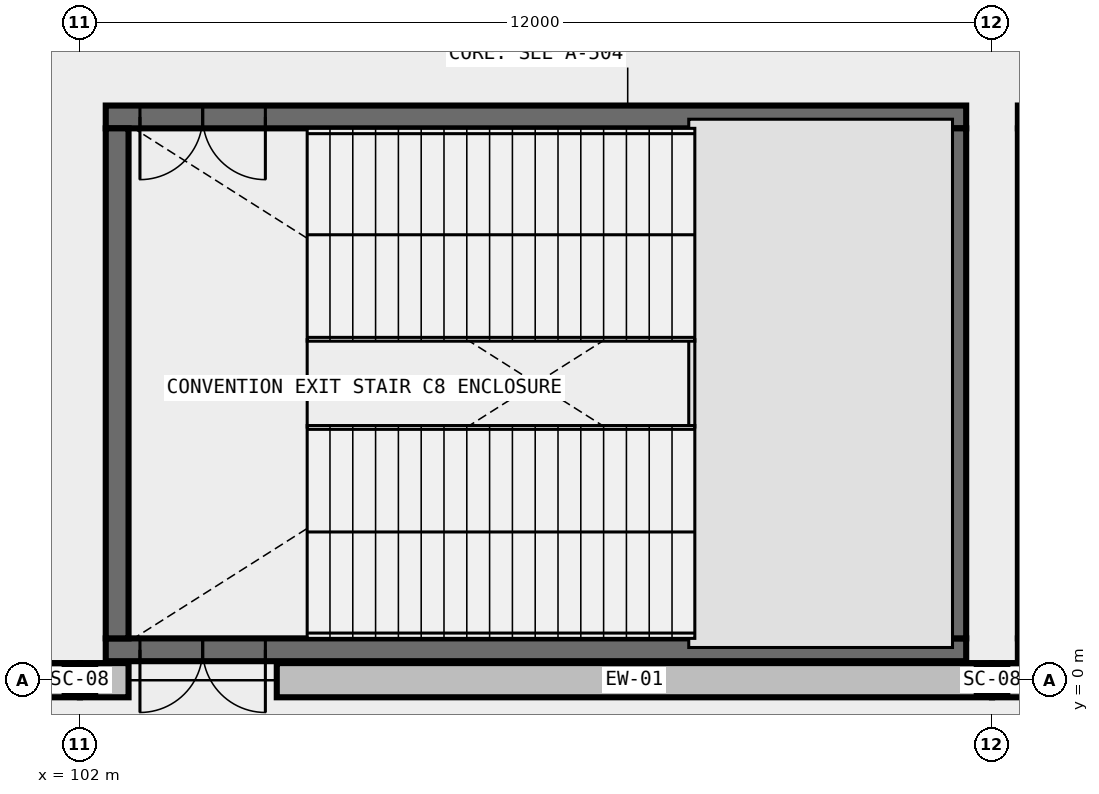
"""IFC4 building model, lengths in metres.
Left out: names, types, materials, properties, quantities, classifications, styles, units other than length and angle.
Written with IfcOpenShell. Run it as: python <this file> out.ifc"""

import sys

from ifc_helpers import new_model, si_unit, direction, frame, frame_2d, origin, origin_2d, place, context, subcontext, project, spatial, rectangle, i_section, extrude, element, fill, save


model = new_model("IFC4")
c1 = context("Model", 3, precision=1e-05, world=origin(), true_north=direction((0.0, 1.0)))
c2 = subcontext(c1, "Body", "Model", "MODEL_VIEW")
j1 = project(units=[si_unit("LENGTHUNIT", "METRE"), si_unit("PLANEANGLEUNIT", "RADIAN")], contexts=[c1])
p1 = place(None, origin())
s1 = spatial("IfcSite", under=j1, at=p1, CompositionType="ELEMENT")
p2 = place(p1, origin())
s2 = spatial("IfcBuilding", under=s1, at=p2, CompositionType="ELEMENT")
p3 = place(p2, origin())
s3 = spatial("IfcBuildingStorey", under=s2, at=p3, CompositionType="ELEMENT", Elevation=0.0)
for number, where, z_axis, x_axis in (
    (1, (102.0, 0.0, 0.0), (0.0, 0.0, 1.0), (1.0, 0.0, 0.0)),
    (2, (114.0, 0.0, 0.0), (0.0, 0.0, 1.0), (1.0, 0.0, 0.0)),
):
    element("IfcColumn", number, at=place(p3, frame(where, z_axis=z_axis, x_axis=x_axis)), inside=s3, PredefinedType="COLUMN", context=c2, shape_type="SweptSolid", body=[
        extrude(i_section(OverallWidth=0.401, OverallDepth=0.399, WebThickness=0.025, FlangeThickness=0.04, FilletRadius=0.031, at=origin_2d()), origin(), (0.0, 0.0, 1.0), 6.0),
    ])
p4 = place(p3, frame((113.66, 0.4, 0.0), z_axis=(0.0, 0.0, 1.0), x_axis=(-1.0, 0.0, 0.0)))
e3 = element("IfcWall", 3, at=p4, inside=s3, PredefinedType="SHEAR", context=c2, shape_type="SweptSolid", body=[
    extrude(rectangle(XDim=11.32, YDim=0.3, at=frame_2d((5.66, 0.0))), origin(), (0.0, 0.0, 1.0), 6.0),
])
p5 = place(p4, frame((9.22, 0.0, 0.0)))
e4 = element("IfcOpeningElement", 4, at=p5, cuts=e3, PredefinedType="OPENING", context=c2, shape_type="SweptSolid", body=[
    extrude(rectangle(XDim=1.65, YDim=2.25, at=frame_2d((0.825, 1.125))), frame((0.0, 0.165, 0.0), z_axis=(0.0, -1.0, 0.0), x_axis=(1.0, 0.0, 0.0)), (0.0, 0.0, 1.0), 0.33),
])
p6 = place(p3, frame((113.66, 7.41, 0.0), z_axis=(0.0, 0.0, 1.0), x_axis=(-1.0, 0.0, 0.0)))
e5 = element("IfcWall", 5, at=p6, inside=s3, PredefinedType="SHEAR", context=c2, shape_type="SweptSolid", body=[
    extrude(rectangle(XDim=11.32, YDim=0.3, at=frame_2d((5.66, 0.0))), origin(), (0.0, 0.0, 1.0), 6.0),
])
p7 = place(p6, frame((9.22, 0.0, 0.0)))
e6 = element("IfcOpeningElement", 6, at=p7, cuts=e5, PredefinedType="OPENING", context=c2, shape_type="SweptSolid", body=[
    extrude(rectangle(XDim=1.65, YDim=2.25, at=frame_2d((0.825, 1.125))), frame((0.0, 0.165, 0.0), z_axis=(0.0, -1.0, 0.0), x_axis=(1.0, 0.0, 0.0)), (0.0, 0.0, 1.0), 0.33),
])
for number, where, z_axis, x_axis in (
    (7, (102.49, 7.26, 0.0), (0.0, 0.0, 1.0), (0.0, -1.0, 0.0)),
    (8, (113.51, 0.55, 0.0), (0.0, 0.0, 1.0), (0.0, 1.0, 0.0)),
):
    element("IfcWall", number, at=place(p3, frame(where, z_axis=z_axis, x_axis=x_axis)), inside=s3, PredefinedType="SHEAR", context=c2, shape_type="SweptSolid", body=[
        extrude(rectangle(XDim=6.71, YDim=0.3, at=frame_2d((3.355, 0.0))), origin(), (0.0, 0.0, 1.0), 6.0),
    ])
p8 = place(p3, frame((125.66, 0.4, 0.0), z_axis=(0.0, 0.0, 1.0), x_axis=(-1.0, 0.0, 0.0)))
e9 = element("IfcWall", 9, at=p8, inside=s3, PredefinedType="SHEAR", context=c2, shape_type="SweptSolid", body=[
    extrude(rectangle(XDim=11.32, YDim=0.3, at=frame_2d((5.66, 0.0))), origin(), (0.0, 0.0, 1.0), 6.0),
])
p9 = place(p8, frame((9.22, 0.0, 0.0)))
e10 = element("IfcOpeningElement", 10, at=p9, cuts=e9, PredefinedType="OPENING", context=c2, shape_type="SweptSolid", body=[
    extrude(rectangle(XDim=1.65, YDim=2.25, at=frame_2d((0.825, 1.125))), frame((0.0, 0.165, 0.0), z_axis=(0.0, -1.0, 0.0), x_axis=(1.0, 0.0, 0.0)), (0.0, 0.0, 1.0), 0.33),
])
p10 = place(p3, frame((125.66, 7.41, 0.0), z_axis=(0.0, 0.0, 1.0), x_axis=(-1.0, 0.0, 0.0)))
e11 = element("IfcWall", 11, at=p10, inside=s3, PredefinedType="SHEAR", context=c2, shape_type="SweptSolid", body=[
    extrude(rectangle(XDim=11.32, YDim=0.3, at=frame_2d((5.66, 0.0))), origin(), (0.0, 0.0, 1.0), 6.0),
])
p11 = place(p10, frame((9.22, 0.0, 0.0)))
e12 = element("IfcOpeningElement", 12, at=p11, cuts=e11, PredefinedType="OPENING", context=c2, shape_type="SweptSolid", body=[
    extrude(rectangle(XDim=1.65, YDim=2.25, at=frame_2d((0.825, 1.125))), frame((0.0, 0.165, 0.0), z_axis=(0.0, -1.0, 0.0), x_axis=(1.0, 0.0, 0.0)), (0.0, 0.0, 1.0), 0.33),
])
p12 = place(p3, frame((114.49, 7.26, 0.0), z_axis=(0.0, 0.0, 1.0), x_axis=(0.0, -1.0, 0.0)))
e13 = element("IfcWall", 13, at=p12, inside=s3, PredefinedType="SHEAR", context=c2, shape_type="SweptSolid", body=[
    extrude(rectangle(XDim=6.71, YDim=0.3, at=frame_2d((3.355, 0.0))), origin(), (0.0, 0.0, 1.0), 6.0),
])
p13 = place(p3, frame((96.0, 0.0, 0.0), z_axis=(0.0, 0.0, 1.0), x_axis=(1.0, 0.0, 0.0)))
e14 = element("IfcWall", 14, at=p13, inside=s3, PredefinedType="STANDARD", context=c2, shape_type="SweptSolid", body=[
    extrude(rectangle(XDim=6.0, YDim=0.45, at=frame_2d((3.0, 0.0))), origin(), (0.0, 0.0, 1.0), 4.676),
])
p14 = place(p3, frame((102.0, 0.0, 0.0), z_axis=(0.0, 0.0, 1.0), x_axis=(1.0, 0.0, 0.0)))
e15 = element("IfcWall", 15, at=p14, inside=s3, PredefinedType="STANDARD", context=c2, shape_type="SweptSolid", body=[
    extrude(rectangle(XDim=0.64, YDim=0.45, at=frame_2d((0.32, 0.0))), origin(), (0.0, 0.0, 1.0), 4.676),
])
p15 = place(p3, frame((104.59, 0.0, 0.0), z_axis=(0.0, 0.0, 1.0), x_axis=(1.0, 0.0, 0.0)))
e16 = element("IfcWall", 16, at=p15, inside=s3, PredefinedType="STANDARD", context=c2, shape_type="SweptSolid", body=[
    extrude(rectangle(XDim=9.41, YDim=0.45, at=frame_2d((4.705, 0.0))), origin(), (0.0, 0.0, 1.0), 4.676),
])
p16 = place(p3, frame((114.0, 0.0, 0.0), z_axis=(0.0, 0.0, 1.0), x_axis=(1.0, 0.0, 0.0)))
e17 = element("IfcWall", 17, at=p16, inside=s3, PredefinedType="STANDARD", context=c2, shape_type="SweptSolid", body=[
    extrude(rectangle(XDim=0.64, YDim=0.45, at=frame_2d((0.32, 0.0))), origin(), (0.0, 0.0, 1.0), 4.676),
])
p17 = place(p7, origin())
e18 = element("IfcDoor", 18, at=p17, inside=s3, OperationType="DOUBLE_DOOR_SINGLE_SWING", PredefinedType="DOOR", context=c2, shape_type="SweptSolid", body=[
    extrude(rectangle(XDim=1.65, YDim=2.25, at=frame_2d((0.825, 1.125))), frame((0.0, 0.025, 0.0), z_axis=(0.0, -1.0, 0.0), x_axis=(1.0, 0.0, 0.0)), (0.0, 0.0, 1.0), 0.05),
])
fill(e6, e18)
p18 = place(p5, origin())
e19 = element("IfcDoor", 19, at=p18, inside=s3, OperationType="DOUBLE_DOOR_SINGLE_SWING", PredefinedType="DOOR", context=c2, shape_type="SweptSolid", body=[
    extrude(rectangle(XDim=1.65, YDim=2.25, at=frame_2d((0.825, 1.125))), frame((0.0, 0.025, 0.0), z_axis=(0.0, -1.0, 0.0), x_axis=(1.0, 0.0, 0.0)), (0.0, 0.0, 1.0), 0.05),
])
fill(e4, e19)
save(model, sys.argv[1])
